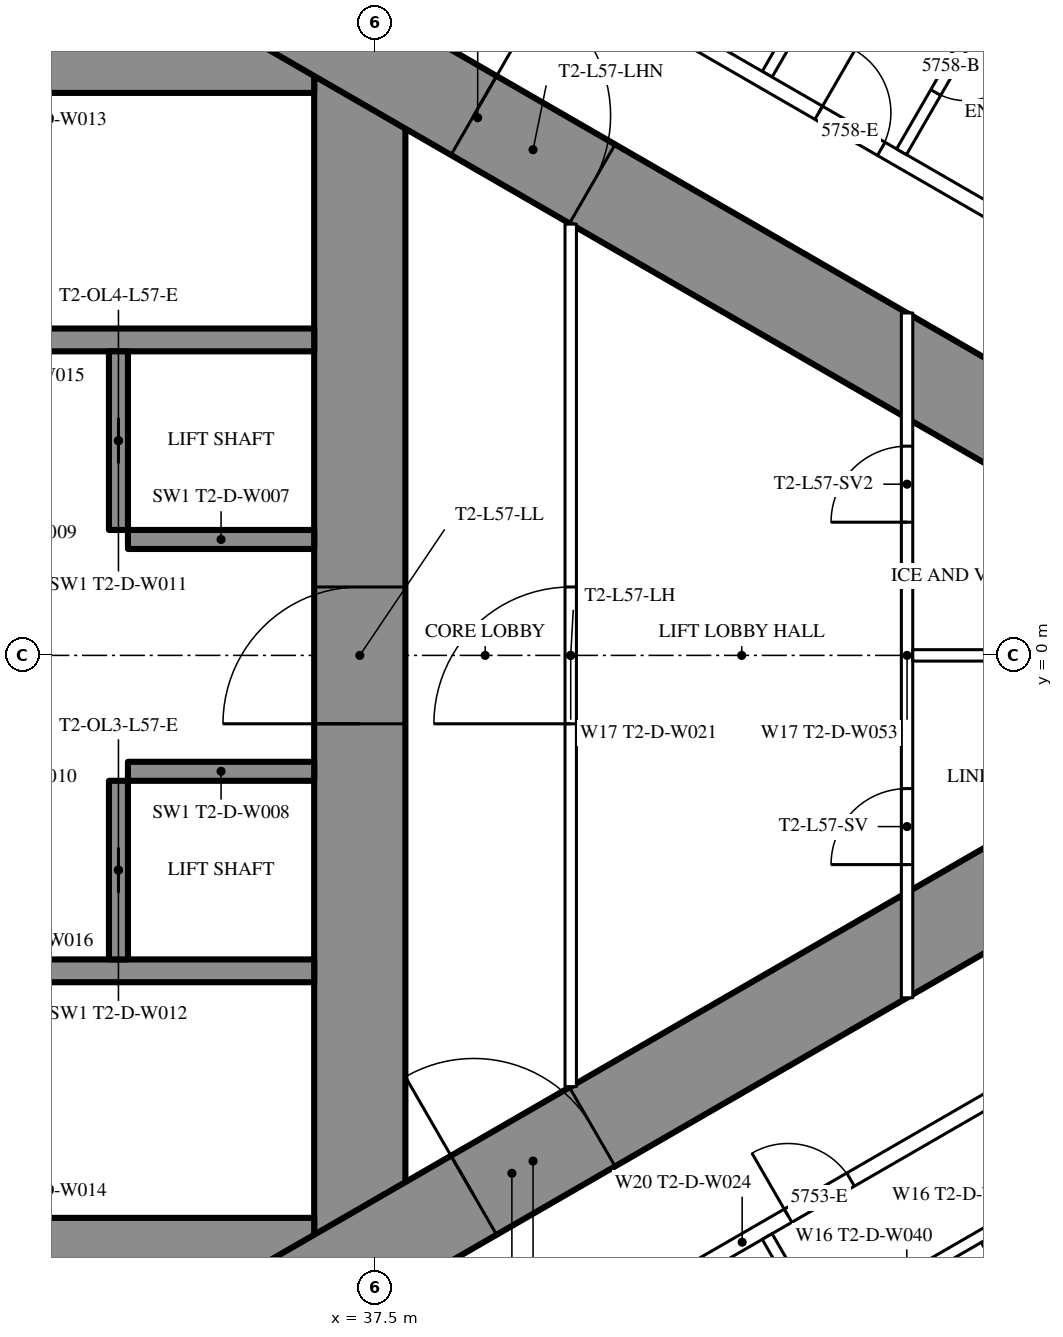
"""IFC4 building model, lengths in metres.
Left out: names, types, materials, properties, quantities, classifications, styles, units other than length and angle.
Written with IfcOpenShell. Run it as: python <this file> out.ifc"""

import sys

from ifc_helpers import new_model, si_unit, direction, frame, frame_2d, origin, place, context, subcontext, project, spatial, rectangle, extrude, element, fill, save


model = new_model("IFC4")
c1 = context("Model", 3, precision=1e-05, world=origin(), true_north=direction((0.0, 1.0)))
c2 = subcontext(c1, "Body", "Model", "MODEL_VIEW")
j1 = project(units=[si_unit("LENGTHUNIT", "METRE"), si_unit("PLANEANGLEUNIT", "RADIAN")], contexts=[c1])
p1 = place(None, origin())
s1 = spatial("IfcSite", under=j1, at=p1, CompositionType="ELEMENT")
p2 = place(p1, origin())
s2 = spatial("IfcBuilding", under=s1, at=p2, CompositionType="ELEMENT")
p3 = place(p2, frame((0.0, 0.0, 215.3)))
s3 = spatial("IfcBuildingStorey", under=s2, at=p3, CompositionType="ELEMENT", Elevation=215.3)
p4 = place(p3, frame((37.3, -8.6, 0.0), z_axis=(0.0, 0.0, 1.0), x_axis=(0.0, 1.0, 0.0)))
e1 = element("IfcWall", 1, at=p4, inside=s3, PredefinedType="SHEAR", context=c2, shape_type="SweptSolid", body=[
    extrude(rectangle(XDim=17.2, YDim=1.2, at=frame_2d((8.6, 0.0))), origin(), (0.0, 0.0, 1.0), 3.6),
])
p5 = place(p4, frame((7.7, 0.0, 0.0)))
e2 = element("IfcOpeningElement", 2, at=p5, cuts=e1, PredefinedType="OPENING", context=c2, shape_type="SweptSolid", body=[
    extrude(rectangle(XDim=1.8, YDim=2.2, at=frame_2d((0.9, 1.1))), frame((0.0, 0.61, 0.0), z_axis=(0.0, -1.0, 0.0), x_axis=(1.0, 0.0, 0.0)), (0.0, 0.0, 1.0), 1.22),
])
p6 = place(p3, frame((28.3, -8.0, 0.0), z_axis=(0.0, 0.0, 1.0), x_axis=(1.0, 0.0, 0.0)))
e3 = element("IfcWall", 3, at=p6, inside=s3, PredefinedType="SHEAR", context=c2, shape_type="SweptSolid", body=[
    extrude(rectangle(XDim=8.4, YDim=1.2, at=frame_2d((4.2, 0.0))), origin(), (0.0, 0.0, 1.0), 3.6),
])
p7 = place(p6, frame((0.25, 0.0, 0.0)))
e4 = element("IfcOpeningElement", 4, at=p7, cuts=e3, PredefinedType="OPENING", context=c2, shape_type="SweptSolid", body=[
    extrude(rectangle(XDim=1.0, YDim=2.2, at=frame_2d((0.5, 1.1))), frame((0.0, 0.61, 0.0), z_axis=(0.0, -1.0, 0.0), x_axis=(1.0, 0.0, 0.0)), (0.0, 0.0, 1.0), 1.22),
])
p8 = place(p3, frame((28.3, 8.0, 0.0), z_axis=(0.0, 0.0, 1.0), x_axis=(1.0, 0.0, 0.0)))
e5 = element("IfcWall", 5, at=p8, inside=s3, PredefinedType="SHEAR", context=c2, shape_type="SweptSolid", body=[
    extrude(rectangle(XDim=8.4, YDim=1.2, at=frame_2d((4.2, 0.0))), origin(), (0.0, 0.0, 1.0), 3.6),
])
p9 = place(p8, frame((0.25, 0.0, 0.0)))
e6 = element("IfcOpeningElement", 6, at=p9, cuts=e5, PredefinedType="OPENING", context=c2, shape_type="SweptSolid", body=[
    extrude(rectangle(XDim=1.0, YDim=2.2, at=frame_2d((0.5, 1.1))), frame((0.0, 0.61, 0.0), z_axis=(0.0, -1.0, 0.0), x_axis=(1.0, 0.0, 0.0)), (0.0, 0.0, 1.0), 1.22),
])
for number, where, z_axis, x_axis in (
    (7, (28.3, -4.15, 0.0), (0.0, 0.0, 1.0), (1.0, 0.0, 0.0)),
    (8, (28.3, 4.15, 0.0), (0.0, 0.0, 1.0), (1.0, 0.0, 0.0)),
):
    element("IfcWall", number, at=place(p3, frame(where, z_axis=z_axis, x_axis=x_axis)), inside=s3, PredefinedType="SHEAR", context=c2, shape_type="SweptSolid", body=[
        extrude(rectangle(XDim=8.4, YDim=0.3, at=frame_2d((4.2, 0.0))), origin(), (0.0, 0.0, 1.0), 3.6),
    ])
p10 = place(p3, frame((34.125, -4.0, 0.0), z_axis=(0.0, 0.0, 1.0), x_axis=(0.0, 1.0, 0.0)))
e9 = element("IfcWall", 9, at=p10, inside=s3, PredefinedType="SHEAR", context=c2, shape_type="SweptSolid", body=[
    extrude(rectangle(XDim=2.35, YDim=0.25, at=frame_2d((1.175, 0.0))), origin(), (0.0, 0.0, 1.0), 3.6),
])
p11 = place(p10, frame((0.875, 0.0, 0.0)))
e10 = element("IfcOpeningElement", 10, at=p11, cuts=e9, PredefinedType="OPENING", context=c2, shape_type="SweptSolid", body=[
    extrude(rectangle(XDim=0.6, YDim=2.0, at=frame_2d((0.3, 1.0))), frame((0.0, 0.135, 0.0), z_axis=(0.0, -1.0, 0.0), x_axis=(1.0, 0.0, 0.0)), (0.0, 0.0, 1.0), 0.27),
])
p12 = place(p3, frame((34.25, -1.525, 0.0), z_axis=(0.0, 0.0, 1.0), x_axis=(1.0, 0.0, 0.0)))
e11 = element("IfcWall", 11, at=p12, inside=s3, PredefinedType="SHEAR", context=c2, shape_type="SweptSolid", body=[
    extrude(rectangle(XDim=2.45, YDim=0.25, at=frame_2d((1.225, 0.0))), origin(), (0.0, 0.0, 1.0), 3.6),
])
p13 = place(p3, frame((34.125, 1.65, 0.0), z_axis=(0.0, 0.0, 1.0), x_axis=(0.0, 1.0, 0.0)))
e12 = element("IfcWall", 12, at=p13, inside=s3, PredefinedType="SHEAR", context=c2, shape_type="SweptSolid", body=[
    extrude(rectangle(XDim=2.35, YDim=0.25, at=frame_2d((1.175, 0.0))), origin(), (0.0, 0.0, 1.0), 3.6),
])
p14 = place(p13, frame((0.875, 0.0, 0.0)))
e13 = element("IfcOpeningElement", 13, at=p14, cuts=e12, PredefinedType="OPENING", context=c2, shape_type="SweptSolid", body=[
    extrude(rectangle(XDim=0.6, YDim=2.0, at=frame_2d((0.3, 1.0))), frame((0.0, 0.135, 0.0), z_axis=(0.0, -1.0, 0.0), x_axis=(1.0, 0.0, 0.0)), (0.0, 0.0, 1.0), 0.27),
])
p15 = place(p3, frame((34.25, 1.525, 0.0), z_axis=(0.0, 0.0, 1.0), x_axis=(1.0, 0.0, 0.0)))
e14 = element("IfcWall", 14, at=p15, inside=s3, PredefinedType="SHEAR", context=c2, shape_type="SweptSolid", body=[
    extrude(rectangle(XDim=2.45, YDim=0.25, at=frame_2d((1.225, 0.0))), origin(), (0.0, 0.0, 1.0), 3.6),
])
p16 = place(p3, frame((27.2, -13.8, 0.0), z_axis=(0.0, 0.0, 1.0), x_axis=(0.866027159892, 0.499996958321, 0.0)))
e15 = element("IfcWall", 15, at=p16, inside=s3, PredefinedType="SHEAR", context=c2, shape_type="SweptSolid", body=[
    extrude(rectangle(XDim=27.947, YDim=1.2, at=frame_2d((13.973, 0.0))), origin(), (0.0, 0.0, 1.0), 3.6),
])
p17 = place(p16, frame((4.6, 0.0, 0.0)))
e16 = element("IfcOpeningElement", 16, at=p17, cuts=e15, PredefinedType="OPENING", context=c2, shape_type="SweptSolid", body=[
    extrude(rectangle(XDim=1.0, YDim=2.2, at=frame_2d((0.5, 1.1))), frame((0.0, 0.61, 0.0), z_axis=(0.0, -1.0, 0.0), x_axis=(1.0, 0.0, 0.0)), (0.0, 0.0, 1.0), 1.22),
])
p18 = place(p16, frame((13.395, 0.0, 0.0)))
e17 = element("IfcOpeningElement", 17, at=p18, cuts=e15, PredefinedType="OPENING", context=c2, shape_type="SweptSolid", body=[
    extrude(rectangle(XDim=1.8, YDim=2.2, at=frame_2d((0.9, 1.1))), frame((0.0, 0.61, 0.0), z_axis=(0.0, -1.0, 0.0), x_axis=(1.0, 0.0, 0.0)), (0.0, 0.0, 1.0), 1.22),
])
p19 = place(p3, frame((27.2, 13.8, 0.0), z_axis=(0.0, 0.0, 1.0), x_axis=(0.866024515034, -0.500001539357, 0.0)))
e18 = element("IfcWall", 18, at=p19, inside=s3, PredefinedType="SHEAR", context=c2, shape_type="SweptSolid", body=[
    extrude(rectangle(XDim=26.907, YDim=1.2, at=frame_2d((13.454, 0.0))), origin(), (0.0, 0.0, 1.0), 3.6),
])
p20 = place(p19, frame((4.6, 0.0, 0.0)))
e19 = element("IfcOpeningElement", 19, at=p20, cuts=e18, PredefinedType="OPENING", context=c2, shape_type="SweptSolid", body=[
    extrude(rectangle(XDim=1.0, YDim=2.2, at=frame_2d((0.5, 1.1))), frame((0.0, 0.61, 0.0), z_axis=(0.0, -1.0, 0.0), x_axis=(1.0, 0.0, 0.0)), (0.0, 0.0, 1.0), 1.22),
])
p21 = place(p19, frame((13.395, 0.0, 0.0)))
e20 = element("IfcOpeningElement", 20, at=p21, cuts=e18, PredefinedType="OPENING", context=c2, shape_type="SweptSolid", body=[
    extrude(rectangle(XDim=1.8, YDim=2.2, at=frame_2d((0.9, 1.1))), frame((0.0, 0.61, 0.0), z_axis=(0.0, -1.0, 0.0), x_axis=(1.0, 0.0, 0.0)), (0.0, 0.0, 1.0), 1.22),
])
p22 = place(p3, frame((28.959, -15.44, 0.0), z_axis=(0.0, 0.0, 1.0), x_axis=(0.866025227435, 0.500000305447, 0.0)))
e21 = element("IfcWall", 21, at=p22, inside=s3, PredefinedType="PARTITIONING", context=c2, shape_type="SweptSolid", body=[
    extrude(rectangle(XDim=30.88, YDim=0.2, at=frame_2d((15.44, 0.0))), origin(), (0.0, 0.0, 1.0), 3.35),
])
p23 = place(p22, frame((0.494, 0.0, 0.0)))
e22 = element("IfcOpeningElement", 22, at=p23, cuts=e21, PredefinedType="OPENING", context=c2, shape_type="SweptSolid", body=[
    extrude(rectangle(XDim=1.8, YDim=2.2, at=frame_2d((0.9, 1.1))), frame((0.0, 0.11, 0.0), z_axis=(0.0, -1.0, 0.0), x_axis=(1.0, 0.0, 0.0)), (0.0, 0.0, 1.0), 0.22),
])
p24 = place(p22, frame((7.687, 0.0, 0.0)))
e23 = element("IfcOpeningElement", 23, at=p24, cuts=e21, PredefinedType="OPENING", context=c2, shape_type="SweptSolid", body=[
    extrude(rectangle(XDim=1.0, YDim=2.2, at=frame_2d((0.5, 1.1))), frame((0.0, 0.11, 0.0), z_axis=(0.0, -1.0, 0.0), x_axis=(1.0, 0.0, 0.0)), (0.0, 0.0, 1.0), 0.22),
])
p25 = place(p22, frame((16.137, 0.0, 0.0)))
e24 = element("IfcOpeningElement", 24, at=p25, cuts=e21, PredefinedType="OPENING", context=c2, shape_type="SweptSolid", body=[
    extrude(rectangle(XDim=0.95, YDim=2.2, at=frame_2d((0.475, 1.1))), frame((0.0, 0.11, 0.0), z_axis=(0.0, -1.0, 0.0), x_axis=(1.0, 0.0, 0.0)), (0.0, 0.0, 1.0), 0.22),
])
p26 = place(p22, frame((20.021, 0.0, 0.0)))
e25 = element("IfcOpeningElement", 25, at=p26, cuts=e21, PredefinedType="OPENING", context=c2, shape_type="SweptSolid", body=[
    extrude(rectangle(XDim=0.95, YDim=2.2, at=frame_2d((0.475, 1.1))), frame((0.0, 0.11, 0.0), z_axis=(0.0, -1.0, 0.0), x_axis=(1.0, 0.0, 0.0)), (0.0, 0.0, 1.0), 0.22),
])
p27 = place(p22, frame((26.253, 0.0, 0.0)))
e26 = element("IfcOpeningElement", 26, at=p27, cuts=e21, PredefinedType="OPENING", context=c2, shape_type="SweptSolid", body=[
    extrude(rectangle(XDim=0.95, YDim=2.2, at=frame_2d((0.475, 1.1))), frame((0.0, 0.11, 0.0), z_axis=(0.0, -1.0, 0.0), x_axis=(1.0, 0.0, 0.0)), (0.0, 0.0, 1.0), 0.22),
])
for number, where, z_axis, x_axis in (
    (27, (42.66, -7.646, 0.0), (0.0, 0.0, 1.0), (0.5, -0.866, 0.0)),
    (28, (42.66, 7.646, 0.0), (0.0, 0.0, 1.0), (0.5, 0.866, 0.0)),
):
    element("IfcWall", number, at=place(p3, frame(where, z_axis=z_axis, x_axis=x_axis)), inside=s3, PredefinedType="PARTITIONING", context=c2, shape_type="SweptSolid", body=[
        extrude(rectangle(XDim=6.398, YDim=0.15, at=frame_2d((3.199, 0.0))), origin(), (0.0, 0.0, 1.0), 2.45),
    ])
p28 = place(p3, frame((28.959, 15.44, 0.0), z_axis=(0.0, 0.0, 1.0), x_axis=(0.866028936079, -0.499993881836, 0.0)))
e29 = element("IfcWall", 29, at=p28, inside=s3, PredefinedType="PARTITIONING", context=c2, shape_type="SweptSolid", body=[
    extrude(rectangle(XDim=20.503, YDim=0.2, at=frame_2d((10.251, 0.0))), origin(), (0.0, 0.0, 1.0), 3.35),
])
p29 = place(p28, frame((16.603, 0.0, 0.0)))
e30 = element("IfcOpeningElement", 30, at=p29, cuts=e29, PredefinedType="OPENING", context=c2, shape_type="SweptSolid", body=[
    extrude(rectangle(XDim=0.95, YDim=2.2, at=frame_2d((0.475, 1.1))), frame((0.0, 0.11, 0.0), z_axis=(0.0, -1.0, 0.0), x_axis=(1.0, 0.0, 0.0)), (0.0, 0.0, 1.0), 0.22),
])
p30 = place(p28, frame((7.287, 0.0, 0.0)))
e31 = element("IfcOpeningElement", 31, at=p30, cuts=e29, PredefinedType="OPENING", context=c2, shape_type="SweptSolid", body=[
    extrude(rectangle(XDim=0.95, YDim=2.2, at=frame_2d((0.475, 1.1))), frame((0.0, 0.11, 0.0), z_axis=(0.0, -1.0, 0.0), x_axis=(1.0, 0.0, 0.0)), (0.0, 0.0, 1.0), 0.22),
])
p31 = place(p28, frame((2.244, 0.0, 0.0)))
e32 = element("IfcOpeningElement", 32, at=p31, cuts=e29, PredefinedType="OPENING", context=c2, shape_type="SweptSolid", body=[
    extrude(rectangle(XDim=1.8, YDim=2.2, at=frame_2d((0.9, 1.1))), frame((0.0, 0.11, 0.0), z_axis=(0.0, -1.0, 0.0), x_axis=(1.0, 0.0, 0.0)), (0.0, 0.0, 1.0), 0.22),
])
p32 = place(p3, frame((45.503, -7.621, 0.0), z_axis=(0.0, 0.0, 1.0), x_axis=(0.500006934395, -0.866021400173, 0.0)))
e33 = element("IfcWall", 33, at=p32, inside=s3, PredefinedType="PARTITIONING", context=c2, shape_type="SweptSolid", body=[
    extrude(rectangle(XDim=2.6, YDim=0.15, at=frame_2d((1.3, 0.0))), origin(), (0.0, 0.0, 1.0), 3.35),
])
p33 = place(p32, frame((0.9, 0.0, 0.0)))
e34 = element("IfcOpeningElement", 34, at=p33, cuts=e33, PredefinedType="OPENING", context=c2, shape_type="SweptSolid", body=[
    extrude(rectangle(XDim=0.8, YDim=2.2, at=frame_2d((0.4, 1.1))), frame((0.0, 0.085, 0.0), z_axis=(0.0, -1.0, 0.0), x_axis=(1.0, 0.0, 0.0)), (0.0, 0.0, 1.0), 0.17),
])
p34 = place(p3, frame((43.425, -8.821, 0.0), z_axis=(0.0, 0.0, 1.0), x_axis=(0.866006523861, 0.500032699561, 0.0)))
e35 = element("IfcWall", 35, at=p34, inside=s3, PredefinedType="PARTITIONING", context=c2, shape_type="SweptSolid", body=[
    extrude(rectangle(XDim=2.475, YDim=0.15, at=frame_2d((1.237, 0.0))), origin(), (0.0, 0.0, 1.0), 3.35),
])
p35 = place(p3, frame((44.427, 6.625, 0.0), z_axis=(0.0, 0.0, 1.0), x_axis=(0.500006934395, 0.866021400173, 0.0)))
e36 = element("IfcWall", 36, at=p35, inside=s3, PredefinedType="PARTITIONING", context=c2, shape_type="SweptSolid", body=[
    extrude(rectangle(XDim=2.6, YDim=0.15, at=frame_2d((1.3, 0.0))), origin(), (0.0, 0.0, 1.0), 3.35),
])
p36 = place(p35, frame((0.9, 0.0, 0.0)))
e37 = element("IfcOpeningElement", 37, at=p36, cuts=e36, PredefinedType="OPENING", context=c2, shape_type="SweptSolid", body=[
    extrude(rectangle(XDim=0.8, YDim=2.2, at=frame_2d((0.4, 1.1))), frame((0.0, 0.085, 0.0), z_axis=(0.0, -1.0, 0.0), x_axis=(1.0, 0.0, 0.0)), (0.0, 0.0, 1.0), 0.17),
])
p37 = place(p3, frame((40.075, -5.674, 0.0), z_axis=(0.0, 0.0, 1.0), x_axis=(0.0, 1.0, 0.0)))
e38 = element("IfcWall", 38, at=p37, inside=s3, PredefinedType="PARTITIONING", context=c2, shape_type="SweptSolid", body=[
    extrude(rectangle(XDim=11.348, YDim=0.15, at=frame_2d((5.674, 0.0))), origin(), (0.0, 0.0, 1.0), 3.35),
])
p38 = place(p37, frame((4.774, 0.0, 0.0)))
e39 = element("IfcOpeningElement", 39, at=p38, cuts=e38, PredefinedType="OPENING", context=c2, shape_type="SweptSolid", body=[
    extrude(rectangle(XDim=1.8, YDim=2.2, at=frame_2d((0.9, 1.1))), frame((0.0, 0.085, 0.0), z_axis=(0.0, -1.0, 0.0), x_axis=(1.0, 0.0, 0.0)), (0.0, 0.0, 1.0), 0.17),
])
p39 = place(p3, frame((44.5, -4.505, 0.0), z_axis=(0.0, 0.0, 1.0), x_axis=(0.0, 1.0, 0.0)))
e40 = element("IfcWall", 40, at=p39, inside=s3, PredefinedType="PARTITIONING", context=c2, shape_type="SweptSolid", body=[
    extrude(rectangle(XDim=9.009, YDim=0.15, at=frame_2d((4.505, 0.0))), origin(), (0.0, 0.0, 1.0), 3.35),
])
p40 = place(p39, frame((1.752, 0.0, 0.0)))
e41 = element("IfcOpeningElement", 41, at=p40, cuts=e40, PredefinedType="OPENING", context=c2, shape_type="SweptSolid", body=[
    extrude(rectangle(XDim=1.0, YDim=2.2, at=frame_2d((0.5, 1.1))), frame((0.0, 0.085, 0.0), z_axis=(0.0, -1.0, 0.0), x_axis=(1.0, 0.0, 0.0)), (0.0, 0.0, 1.0), 0.17),
])
p41 = place(p39, frame((6.257, 0.0, 0.0)))
e42 = element("IfcOpeningElement", 42, at=p41, cuts=e40, PredefinedType="OPENING", context=c2, shape_type="SweptSolid", body=[
    extrude(rectangle(XDim=1.0, YDim=2.2, at=frame_2d((0.5, 1.1))), frame((0.0, 0.085, 0.0), z_axis=(0.0, -1.0, 0.0), x_axis=(1.0, 0.0, 0.0)), (0.0, 0.0, 1.0), 0.17),
])
p42 = place(p3, frame((44.575, 0.0, 0.0), z_axis=(0.0, 0.0, 1.0), x_axis=(1.0, 0.0, 0.0)))
e43 = element("IfcWall", 43, at=p42, inside=s3, PredefinedType="PARTITIONING", context=c2, shape_type="SweptSolid", body=[
    extrude(rectangle(XDim=7.727, YDim=0.15, at=frame_2d((3.864, 0.0))), origin(), (0.0, 0.0, 1.0), 2.45),
])
p43 = place(p25, origin())
e44 = element("IfcDoor", 44, at=p43, inside=s3, OperationType="SINGLE_SWING_LEFT", PredefinedType="DOOR", context=c2, shape_type="SweptSolid", body=[
    extrude(rectangle(XDim=0.95, YDim=2.2, at=frame_2d((0.475, 1.1))), frame((0.0, 0.025, 0.0), z_axis=(0.0, -1.0, 0.0), x_axis=(1.0, 0.0, 0.0)), (0.0, 0.0, 1.0), 0.05),
])
fill(e24, e44)
p44 = place(p36, origin())
e45 = element("IfcDoor", 45, at=p44, inside=s3, OperationType="SINGLE_SWING_RIGHT", PredefinedType="DOOR", context=c2, shape_type="SweptSolid", body=[
    extrude(rectangle(XDim=0.8, YDim=2.2, at=frame_2d((0.4, 1.1))), frame((0.0, 0.025, 0.0), z_axis=(0.0, -1.0, 0.0), x_axis=(1.0, 0.0, 0.0)), (0.0, 0.0, 1.0), 0.05),
])
fill(e37, e45)
p45 = place(p29, origin())
e46 = element("IfcDoor", 46, at=p45, inside=s3, OperationType="SINGLE_SWING_LEFT", PredefinedType="DOOR", context=c2, shape_type="SweptSolid", body=[
    extrude(rectangle(XDim=0.95, YDim=2.2, at=frame_2d((0.475, 1.1))), frame((0.0, 0.025, 0.0), z_axis=(0.0, -1.0, 0.0), x_axis=(1.0, 0.0, 0.0)), (0.0, 0.0, 1.0), 0.05),
])
fill(e30, e46)
p46 = place(p38, origin())
e47 = element("IfcDoor", 47, at=p46, inside=s3, OperationType="DOUBLE_DOOR_SINGLE_SWING", PredefinedType="DOOR", context=c2, shape_type="SweptSolid", body=[
    extrude(rectangle(XDim=1.8, YDim=2.2, at=frame_2d((0.9, 1.1))), frame((0.0, 0.025, 0.0), z_axis=(0.0, -1.0, 0.0), x_axis=(1.0, 0.0, 0.0)), (0.0, 0.0, 1.0), 0.05),
])
fill(e39, e47)
p47 = place(p40, origin())
e48 = element("IfcDoor", 48, at=p47, inside=s3, OperationType="SINGLE_SWING_LEFT", PredefinedType="DOOR", context=c2, shape_type="SweptSolid", body=[
    extrude(rectangle(XDim=1.0, YDim=2.2, at=frame_2d((0.5, 1.1))), frame((0.0, 0.025, 0.0), z_axis=(0.0, -1.0, 0.0), x_axis=(1.0, 0.0, 0.0)), (0.0, 0.0, 1.0), 0.05),
])
fill(e41, e48)
p48 = place(p41, origin())
e49 = element("IfcDoor", 49, at=p48, inside=s3, OperationType="SINGLE_SWING_LEFT", PredefinedType="DOOR", context=c2, shape_type="SweptSolid", body=[
    extrude(rectangle(XDim=1.0, YDim=2.2, at=frame_2d((0.5, 1.1))), frame((0.0, 0.025, 0.0), z_axis=(0.0, -1.0, 0.0), x_axis=(1.0, 0.0, 0.0)), (0.0, 0.0, 1.0), 0.05),
])
fill(e42, e49)
p49 = place(p18, origin())
e50 = element("IfcDoor", 50, at=p49, inside=s3, OperationType="DOUBLE_DOOR_SINGLE_SWING", PredefinedType="DOOR", context=c2, shape_type="SweptSolid", body=[
    extrude(rectangle(XDim=1.8, YDim=2.2, at=frame_2d((0.9, 1.1))), frame((0.0, 0.025, 0.0), z_axis=(0.0, -1.0, 0.0), x_axis=(1.0, 0.0, 0.0)), (0.0, 0.0, 1.0), 0.05),
])
fill(e17, e50)
p50 = place(p21, origin())
e51 = element("IfcDoor", 51, at=p50, inside=s3, OperationType="DOUBLE_DOOR_SINGLE_SWING", PredefinedType="DOOR", context=c2, shape_type="SweptSolid", body=[
    extrude(rectangle(XDim=1.8, YDim=2.2, at=frame_2d((0.9, 1.1))), frame((0.0, 0.025, 0.0), z_axis=(0.0, -1.0, 0.0), x_axis=(1.0, 0.0, 0.0)), (0.0, 0.0, 1.0), 0.05),
])
fill(e20, e51)
p51 = place(p5, origin())
e52 = element("IfcDoor", 52, at=p51, inside=s3, OperationType="DOUBLE_DOOR_SINGLE_SWING", PredefinedType="DOOR", context=c2, shape_type="SweptSolid", body=[
    extrude(rectangle(XDim=1.8, YDim=2.2, at=frame_2d((0.9, 1.1))), frame((0.0, 0.025, 0.0), z_axis=(0.0, -1.0, 0.0), x_axis=(1.0, 0.0, 0.0)), (0.0, 0.0, 1.0), 0.05),
])
fill(e2, e52)
p52 = place(p11, origin())
e53 = element("IfcDoor", 53, at=p52, inside=s3, OperationType="SLIDING_TO_LEFT", PredefinedType="DOOR", context=c2, shape_type="SweptSolid", body=[
    extrude(rectangle(XDim=0.6, YDim=2.0, at=frame_2d((0.3, 1.0))), frame((0.0, 0.025, 0.0), z_axis=(0.0, -1.0, 0.0), x_axis=(1.0, 0.0, 0.0)), (0.0, 0.0, 1.0), 0.05),
])
fill(e10, e53)
p53 = place(p14, origin())
e54 = element("IfcDoor", 54, at=p53, inside=s3, OperationType="SLIDING_TO_LEFT", PredefinedType="DOOR", context=c2, shape_type="SweptSolid", body=[
    extrude(rectangle(XDim=0.6, YDim=2.0, at=frame_2d((0.3, 1.0))), frame((0.0, 0.025, 0.0), z_axis=(0.0, -1.0, 0.0), x_axis=(1.0, 0.0, 0.0)), (0.0, 0.0, 1.0), 0.05),
])
fill(e13, e54)
save(model, sys.argv[1])
